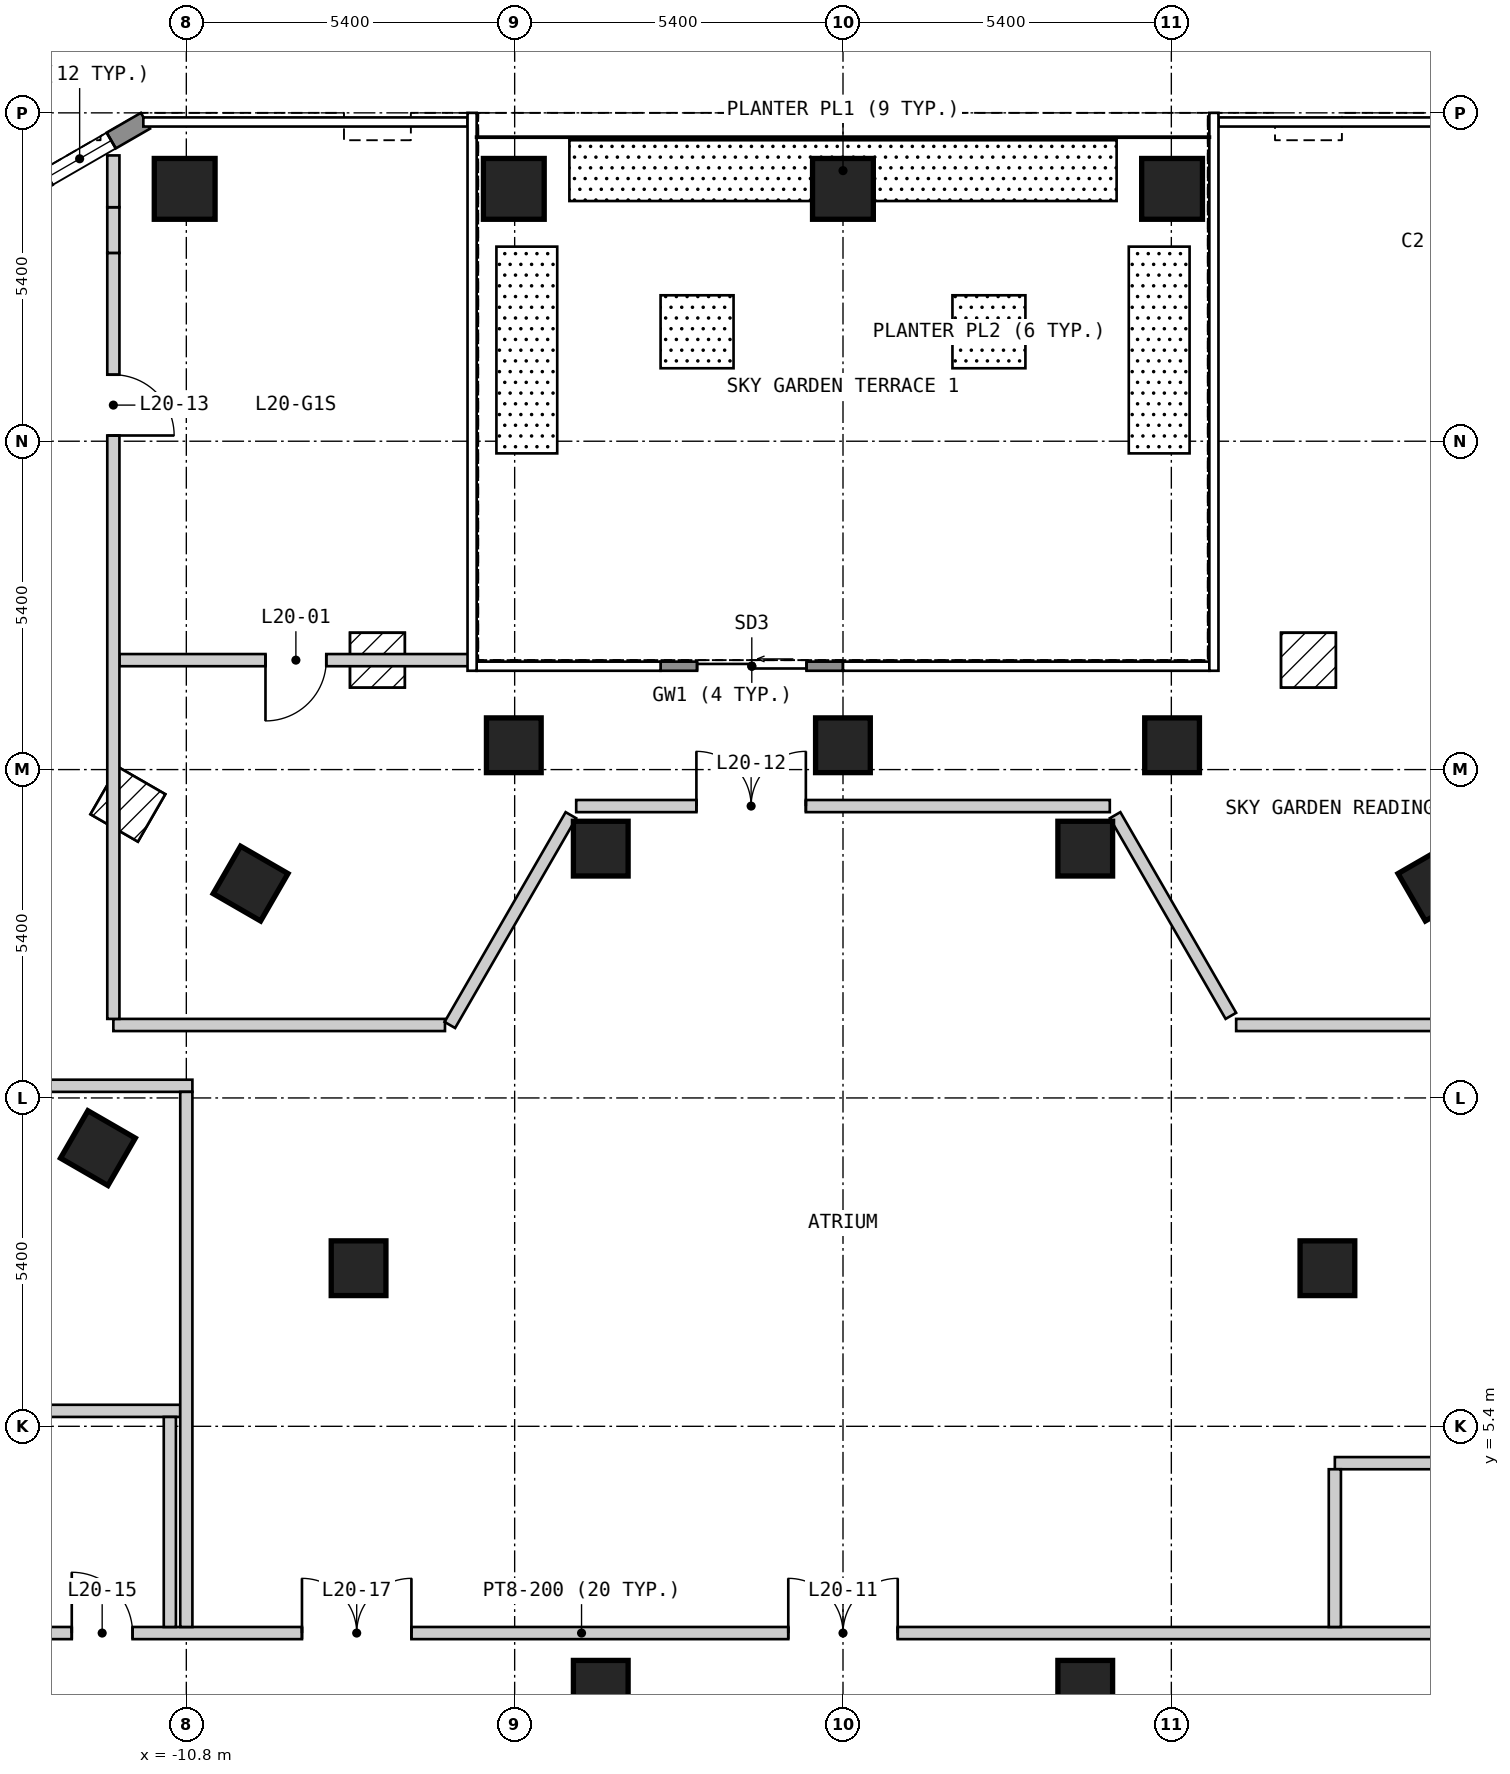
"""IFC4 building model, lengths in metres.
Left out: names, types, materials, properties, quantities, classifications, styles, units other than length and angle.
Written with IfcOpenShell. Run it as: python <this file> out.ifc"""

import sys

from ifc_helpers import new_model, si_unit, direction, frame, frame_2d, origin, origin_2d, place, context, subcontext, project, spatial, polyline, rectangle, outline, extrude, element, fill, save


model = new_model("IFC4")
c1 = context("Model", 3, precision=1e-05, world=origin(), true_north=direction((0.0, 1.0)))
c2 = subcontext(c1, "Body", "Model", "MODEL_VIEW")
j1 = project(units=[si_unit("LENGTHUNIT", "METRE"), si_unit("PLANEANGLEUNIT", "RADIAN")], contexts=[c1])
p1 = place(None, origin())
s1 = spatial("IfcSite", under=j1, at=p1, CompositionType="ELEMENT")
p2 = place(p1, origin())
s2 = spatial("IfcBuilding", under=s1, at=p2, CompositionType="ELEMENT")
p3 = place(p2, frame((0.0, 0.0, 66.0)))
s3 = spatial("IfcBuildingStorey", under=s2, at=p3, CompositionType="ELEMENT", Elevation=66.0)
for number, where, z_axis, x_axis in (
    (1, (5.412, 25.75, 0.0), (0.0, 0.0, 1.0), (-1.0, 0.0, 0.0)),
    (2, (-0.001, 25.75, 0.0), (0.0, 0.0, 1.0), (-1.0, 0.0, 0.0)),
    (3, (-5.414, 25.75, 0.0), (0.0, 0.0, 1.0), (-1.0, 0.0, 0.0)),
    (4, (-10.827, 25.75, 0.0), (0.0, 0.0, 1.0), (-1.0, 0.0, 0.0)),
):
    element("IfcColumn", number, at=place(p3, frame(where, z_axis=z_axis, x_axis=x_axis)), inside=s3, PredefinedType="COLUMN", context=c2, shape_type="SweptSolid", body=[
        extrude(rectangle(XDim=1.0, YDim=1.0, at=origin_2d()), origin(), (0.0, 0.0, 1.0), 6.0),
    ])
for number, where, z_axis, x_axis in (
    (5, (3.984, 1.1, 0.0), (0.0, 0.0, 1.0), (1.0, 0.0, 0.0)),
    (6, (7.967, 8.0, 0.0), (0.0, 0.0, 1.0), (1.0, 0.0, 0.0)),
    (7, (9.743, 14.325, 0.0), (0.0, 0.0, 1.0), (-0.5, 0.866, 0.0)),
    (8, (5.412, 16.6, 0.0), (0.0, 0.0, 1.0), (-1.0, 0.0, 0.0)),
    (9, (3.984, 14.9, 0.0), (0.0, 0.0, 1.0), (1.0, 0.0, 0.0)),
    (10, (-0.001, 16.6, 0.0), (0.0, 0.0, 1.0), (-1.0, 0.0, 0.0)),
    (11, (-3.984, 14.9, 0.0), (0.0, 0.0, 1.0), (1.0, 0.0, 0.0)),
    (12, (-5.414, 16.6, 0.0), (0.0, 0.0, 1.0), (-1.0, 0.0, 0.0)),
    (13, (-9.743, 14.325, 0.0), (0.0, 0.0, 1.0), (-0.5, -0.866, 0.0)),
    (14, (-7.967, 8.0, 0.0), (0.0, 0.0, 1.0), (1.0, 0.0, 0.0)),
    (15, (-12.254, 9.975, 0.0), (0.0, 0.0, 1.0), (-0.5, -0.866, 0.0)),
    (16, (-3.984, 1.1, 0.0), (0.0, 0.0, 1.0), (1.0, 0.0, 0.0)),
):
    element("IfcColumn", number, at=place(p3, frame(where, z_axis=z_axis, x_axis=x_axis)), inside=s3, PredefinedType="COLUMN", context=c2, shape_type="SweptSolid", body=[
        extrude(rectangle(XDim=0.9, YDim=0.9, at=origin_2d()), origin(), (0.0, 0.0, 1.0), 6.0),
    ])
p4 = place(p3, frame((-11.472, 26.87, 0.0), z_axis=(0.0, 0.0, 1.0), x_axis=(-0.866022959057, -0.500004234368, 0.0)))
e17 = element("IfcWall", 17, at=p4, inside=s3, PredefinedType="SOLIDWALL", context=c2, shape_type="SweptSolid", body=[
    extrude(outline(polyline([(0.0, -0.15), (5.0, -0.15), (4.92, 0.15), (0.08, 0.15), (0.0, -0.15)])), origin(), (0.0, 0.0, 1.0), 5.7),
])
p5 = place(p4, frame((0.65, 0.0, 0.15)))
e18 = element("IfcOpeningElement", 18, at=p5, cuts=e17, PredefinedType="OPENING", context=c2, shape_type="SweptSolid", body=[
    extrude(rectangle(XDim=1.2, YDim=2.1, at=frame_2d((0.6, 1.05))), frame((0.0, 0.16, 0.0), z_axis=(0.0, -1.0, 0.0), x_axis=(1.0, 0.0, 0.0)), (0.0, 0.0, 1.0), 0.32),
])
p6 = place(p4, frame((3.149, 0.0, 0.15)))
e19 = element("IfcOpeningElement", 19, at=p6, cuts=e17, PredefinedType="OPENING", context=c2, shape_type="SweptSolid", body=[
    extrude(rectangle(XDim=1.2, YDim=2.1, at=frame_2d((0.6, 1.05))), frame((0.0, 0.16, 0.0), z_axis=(0.0, -1.0, 0.0), x_axis=(1.0, 0.0, 0.0)), (0.0, 0.0, 1.0), 0.32),
])
p7 = place(p3, frame((0.0, 17.9, 0.0), z_axis=(0.0, 0.0, 1.0), x_axis=(-1.0, 0.0, 0.0)))
e20 = element("IfcWall", 20, at=p7, inside=s3, PredefinedType="SOLIDWALL", context=c2, shape_type="SweptSolid", body=[
    extrude(rectangle(XDim=3.0, YDim=0.15, at=frame_2d((1.5, 0.0))), origin(), (0.0, 0.0, 1.0), 5.7),
])
p8 = place(p7, frame((0.6, 0.0, 0.0)))
e21 = element("IfcOpeningElement", 21, at=p8, cuts=e20, PredefinedType="OPENING", context=c2, shape_type="SweptSolid", body=[
    extrude(rectangle(XDim=1.8, YDim=2.4, at=frame_2d((0.9, 1.2))), frame((0.0, 0.085, 0.0), z_axis=(0.0, -1.0, 0.0), x_axis=(1.0, 0.0, 0.0)), (0.0, 0.0, 1.0), 0.17),
])
p9 = place(p3, frame((-22.0, 2.0, 0.0), z_axis=(0.0, 0.0, 1.0), x_axis=(1.0, 0.0, 0.0)))
e22 = element("IfcWall", 22, at=p9, inside=s3, PredefinedType="PARTITIONING", context=c2, shape_type="SweptSolid", body=[
    extrude(rectangle(XDim=35.4, YDim=0.2, at=frame_2d((17.7, 0.0))), origin(), (0.0, 0.0, 1.0), 5.7),
])
p10 = place(p9, frame((3.89, 0.0, 0.0), z_axis=(0.0, 0.0, 1.0), x_axis=(-1.0, 0.0, 0.0)))
e23 = element("IfcOpeningElement", 23, at=p10, cuts=e22, PredefinedType="OPENING", context=c2, shape_type="SweptSolid", body=[
    extrude(rectangle(XDim=1.0, YDim=2.1, at=frame_2d((0.5, 1.05))), frame((0.0, 0.11, 0.0), z_axis=(0.0, -1.0, 0.0), x_axis=(1.0, 0.0, 0.0)), (0.0, 0.0, 1.0), 0.22),
])
p11 = place(p9, frame((21.1, 0.0, 0.0)))
e24 = element("IfcOpeningElement", 24, at=p11, cuts=e22, PredefinedType="OPENING", context=c2, shape_type="SweptSolid", body=[
    extrude(rectangle(XDim=1.8, YDim=2.1, at=frame_2d((0.9, 1.05))), frame((0.0, 0.11, 0.0), z_axis=(0.0, -1.0, 0.0), x_axis=(1.0, 0.0, 0.0)), (0.0, 0.0, 1.0), 0.22),
])
p12 = place(p9, frame((9.316, 0.0, 0.0)))
e25 = element("IfcOpeningElement", 25, at=p12, cuts=e22, PredefinedType="OPENING", context=c2, shape_type="SweptSolid", body=[
    extrude(rectangle(XDim=1.0, YDim=2.1, at=frame_2d((0.5, 1.05))), frame((0.0, 0.11, 0.0), z_axis=(0.0, -1.0, 0.0), x_axis=(1.0, 0.0, 0.0)), (0.0, 0.0, 1.0), 0.22),
])
p13 = place(p9, frame((13.102, 0.0, 0.0)))
e26 = element("IfcOpeningElement", 26, at=p13, cuts=e22, PredefinedType="OPENING", context=c2, shape_type="SweptSolid", body=[
    extrude(rectangle(XDim=1.8, YDim=2.1, at=frame_2d((0.9, 1.05))), frame((0.0, 0.11, 0.0), z_axis=(0.0, -1.0, 0.0), x_axis=(1.0, 0.0, 0.0)), (0.0, 0.0, 1.0), 0.22),
])
p14 = place(p3, frame((8.089, 4.794, 0.0), z_axis=(0.0, 0.0, 1.0), x_axis=(1.0, 0.0, 0.0)))
e27 = element("IfcWall", 27, at=p14, inside=s3, PredefinedType="PARTITIONING", context=c2, shape_type="SweptSolid", body=[
    extrude(rectangle(XDim=17.447, YDim=0.2, at=frame_2d((8.723, 0.0))), origin(), (0.0, 0.0, 1.0), 5.7),
])
p15 = place(p3, frame((-24.964, 5.654, 0.0), z_axis=(0.0, 0.0, 1.0), x_axis=(1.0, 0.0, 0.0)))
e28 = element("IfcWall", 28, at=p15, inside=s3, PredefinedType="PARTITIONING", context=c2, shape_type="SweptSolid", body=[
    extrude(rectangle(XDim=14.064, YDim=0.2, at=frame_2d((7.032, 0.0))), origin(), (0.0, 0.0, 1.0), 5.7),
])
p16 = place(p3, frame((-21.853, 11.0, 0.0), z_axis=(0.0, 0.0, 1.0), x_axis=(1.0, 0.0, 0.0)))
e29 = element("IfcWall", 29, at=p16, inside=s3, PredefinedType="PARTITIONING", context=c2, shape_type="SweptSolid", body=[
    extrude(rectangle(XDim=11.153, YDim=0.2, at=frame_2d((5.577, 0.0))), origin(), (0.0, 0.0, 1.0), 5.7),
])
p17 = place(p16, frame((5.691, 0.0, 0.0), z_axis=(0.0, 0.0, 1.0), x_axis=(-1.0, 0.0, 0.0)))
e30 = element("IfcOpeningElement", 30, at=p17, cuts=e29, PredefinedType="OPENING", context=c2, shape_type="SweptSolid", body=[
    extrude(rectangle(XDim=1.8, YDim=2.1, at=frame_2d((0.9, 1.05))), frame((0.0, 0.11, 0.0), z_axis=(0.0, -1.0, 0.0), x_axis=(1.0, 0.0, 0.0)), (0.0, 0.0, 1.0), 0.22),
])
p18 = place(p3, frame((-12.0, 12.0, 0.0), z_axis=(0.0, 0.0, 1.0), x_axis=(1.0, 0.0, 0.0)))
e31 = element("IfcWall", 31, at=p18, inside=s3, PredefinedType="PARTITIONING", context=c2, shape_type="SweptSolid", body=[
    extrude(rectangle(XDim=5.454, YDim=0.2, at=frame_2d((2.727, 0.0))), origin(), (0.0, 0.0, 1.0), 5.7),
])
p19 = place(p3, frame((6.466, 12.0, 0.0), z_axis=(0.0, 0.0, 1.0), x_axis=(1.0, 0.0, 0.0)))
e32 = element("IfcWall", 32, at=p19, inside=s3, PredefinedType="PARTITIONING", context=c2, shape_type="SweptSolid", body=[
    extrude(rectangle(XDim=5.634, YDim=0.2, at=frame_2d((2.817, 0.0))), origin(), (0.0, 0.0, 1.0), 5.7),
])
p20 = place(p3, frame((-4.388, 15.6, 0.0), z_axis=(0.0, 0.0, 1.0), x_axis=(1.0, 0.0, 0.0)))
e33 = element("IfcWall", 33, at=p20, inside=s3, PredefinedType="PARTITIONING", context=c2, shape_type="SweptSolid", body=[
    extrude(rectangle(XDim=8.776, YDim=0.2, at=frame_2d((4.388, 0.0))), origin(), (0.0, 0.0, 1.0), 5.7),
])
p21 = place(p20, frame((1.977, 0.0, 0.0)))
e34 = element("IfcOpeningElement", 34, at=p21, cuts=e33, PredefinedType="OPENING", context=c2, shape_type="SweptSolid", body=[
    extrude(rectangle(XDim=1.8, YDim=2.1, at=frame_2d((0.9, 1.05))), frame((0.0, 0.11, 0.0), z_axis=(0.0, -1.0, 0.0), x_axis=(1.0, 0.0, 0.0)), (0.0, 0.0, 1.0), 0.22),
])
p22 = place(p3, frame((-11.9, 18.0, 0.0), z_axis=(0.0, 0.0, 1.0), x_axis=(1.0, 0.0, 0.0)))
e35 = element("IfcWall", 35, at=p22, inside=s3, PredefinedType="PARTITIONING", context=c2, shape_type="SweptSolid", body=[
    extrude(rectangle(XDim=5.82, YDim=0.2, at=frame_2d((2.91, 0.0))), origin(), (0.0, 0.0, 1.0), 5.7),
])
p23 = place(p22, frame((3.402, 0.0, 0.0), z_axis=(0.0, 0.0, 1.0), x_axis=(-1.0, 0.0, 0.0)))
e36 = element("IfcOpeningElement", 36, at=p23, cuts=e35, PredefinedType="OPENING", context=c2, shape_type="SweptSolid", body=[
    extrude(rectangle(XDim=1.0, YDim=2.1, at=frame_2d((0.5, 1.05))), frame((0.0, 0.11, 0.0), z_axis=(0.0, -1.0, 0.0), x_axis=(1.0, 0.0, 0.0)), (0.0, 0.0, 1.0), 0.22),
])
p24 = place(p3, frame((-12.0, 12.1, 0.0), z_axis=(0.0, 0.0, 1.0), x_axis=(0.0, 1.0, 0.0)))
e37 = element("IfcWall", 37, at=p24, inside=s3, PredefinedType="PARTITIONING", context=c2, shape_type="SweptSolid", body=[
    extrude(rectangle(XDim=12.597, YDim=0.2, at=frame_2d((6.298, 0.0))), origin(), (0.0, 0.0, 1.0), 5.7),
])
p25 = place(p24, frame((10.594, 0.0, 0.0), z_axis=(0.0, 0.0, 1.0), x_axis=(-1.0, 0.0, 0.0)))
e38 = element("IfcOpeningElement", 38, at=p25, cuts=e37, PredefinedType="OPENING", context=c2, shape_type="SweptSolid", body=[
    extrude(rectangle(XDim=1.0, YDim=2.1, at=frame_2d((0.5, 1.05))), frame((0.0, 0.11, 0.0), z_axis=(0.0, -1.0, 0.0), x_axis=(1.0, 0.0, 0.0)), (0.0, 0.0, 1.0), 0.22),
])
p26 = place(p3, frame((-12.0, 24.697, 0.0), z_axis=(0.0, 0.0, 1.0), x_axis=(0.0, 1.0, 0.0)))
e39 = element("IfcWall", 39, at=p26, inside=s3, PredefinedType="PARTITIONING", context=c2, shape_type="SweptSolid", body=[
    extrude(rectangle(XDim=0.751, YDim=0.2, at=frame_2d((0.375, 0.0))), origin(), (0.0, 0.0, 1.0), 5.02),
])
p27 = place(p3, frame((-12.0, 25.448, 0.0), z_axis=(0.0, 0.0, 1.0), x_axis=(0.0, 1.0, 0.0)))
e40 = element("IfcWall", 40, at=p27, inside=s3, PredefinedType="PARTITIONING", context=c2, shape_type="SweptSolid", body=[
    extrude(rectangle(XDim=0.852, YDim=0.2, at=frame_2d((0.426, 0.0))), origin(), (0.0, 0.0, 1.0), 5.7),
])
p28 = place(p3, frame((-11.071, 2.1, 0.0), z_axis=(0.0, 0.0, 1.0), x_axis=(0.0, 1.0, 0.0)))
e41 = element("IfcWall", 41, at=p28, inside=s3, PredefinedType="PARTITIONING", context=c2, shape_type="SweptSolid", body=[
    extrude(rectangle(XDim=3.454, YDim=0.2, at=frame_2d((1.727, 0.0))), origin(), (0.0, 0.0, 1.0), 5.7),
])
p29 = place(p3, frame((-10.8, 2.1, 0.0), z_axis=(0.0, 0.0, 1.0), x_axis=(0.0, 1.0, 0.0)))
e42 = element("IfcWall", 42, at=p29, inside=s3, PredefinedType="PARTITIONING", context=c2, shape_type="SweptSolid", body=[
    extrude(rectangle(XDim=8.8, YDim=0.2, at=frame_2d((4.4, 0.0))), origin(), (0.0, 0.0, 1.0), 5.7),
])
p30 = place(p3, frame((8.089, 2.1, 0.0), z_axis=(0.0, 0.0, 1.0), x_axis=(0.0, 1.0, 0.0)))
e43 = element("IfcWall", 43, at=p30, inside=s3, PredefinedType="PARTITIONING", context=c2, shape_type="SweptSolid", body=[
    extrude(rectangle(XDim=2.594, YDim=0.2, at=frame_2d((1.297, 0.0))), origin(), (0.0, 0.0, 1.0), 5.7),
])
p31 = place(p3, frame((4.475, 15.45, 0.0), z_axis=(0.0, 0.0, 1.0), x_axis=(0.499709509062, -0.866193053859, 0.0)))
e44 = element("IfcWall", 44, at=p31, inside=s3, PredefinedType="PARTITIONING", context=c2, shape_type="SweptSolid", body=[
    extrude(rectangle(XDim=3.81, YDim=0.2, at=frame_2d((1.905, 0.0))), origin(), (0.0, 0.0, 1.0), 5.7),
])
p32 = place(p3, frame((-6.466, 12.0, 0.0), z_axis=(0.0, 0.0, 1.0), x_axis=(0.49983741437, 0.866119252295, 0.0)))
e45 = element("IfcWall", 45, at=p32, inside=s3, PredefinedType="PARTITIONING", context=c2, shape_type="SweptSolid", body=[
    extrude(rectangle(XDim=3.983, YDim=0.2, at=frame_2d((1.992, 0.0))), origin(), (0.0, 0.0, 1.0), 5.7),
])
p33 = place(p5, origin())
e46 = element("IfcWindow", 46, at=p33, inside=s3, PartitioningType="SINGLE_PANEL", PredefinedType="WINDOW", context=c2, shape_type="SweptSolid", body=[
    extrude(rectangle(XDim=1.2, YDim=2.1, at=frame_2d((0.6, 1.05))), frame((0.0, 0.03, 0.0), z_axis=(0.0, -1.0, 0.0), x_axis=(1.0, 0.0, 0.0)), (0.0, 0.0, 1.0), 0.06),
])
fill(e18, e46)
p34 = place(p8, origin())
e47 = element("IfcDoor", 47, at=p34, inside=s3, OperationType="SLIDING_TO_LEFT", PredefinedType="DOOR", context=c2, shape_type="SweptSolid", body=[
    extrude(rectangle(XDim=1.8, YDim=2.4, at=frame_2d((0.9, 1.2))), frame((0.0, 0.025, 0.0), z_axis=(0.0, -1.0, 0.0), x_axis=(1.0, 0.0, 0.0)), (0.0, 0.0, 1.0), 0.05),
])
fill(e21, e47)
p35 = place(p23, origin())
e48 = element("IfcDoor", 48, at=p35, inside=s3, OperationType="SINGLE_SWING_RIGHT", PredefinedType="DOOR", context=c2, shape_type="SweptSolid", body=[
    extrude(rectangle(XDim=1.0, YDim=2.1, at=frame_2d((0.5, 1.05))), frame((0.0, 0.025, 0.0), z_axis=(0.0, -1.0, 0.0), x_axis=(1.0, 0.0, 0.0)), (0.0, 0.0, 1.0), 0.05),
])
fill(e36, e48)
p36 = place(p11, origin())
e49 = element("IfcDoor", 49, at=p36, inside=s3, OperationType="DOUBLE_DOOR_SINGLE_SWING", PredefinedType="DOOR", context=c2, shape_type="SweptSolid", body=[
    extrude(rectangle(XDim=1.8, YDim=2.1, at=frame_2d((0.9, 1.05))), frame((0.0, 0.025, 0.0), z_axis=(0.0, -1.0, 0.0), x_axis=(1.0, 0.0, 0.0)), (0.0, 0.0, 1.0), 0.05),
])
fill(e24, e49)
p37 = place(p21, origin())
e50 = element("IfcDoor", 50, at=p37, inside=s3, OperationType="DOUBLE_DOOR_SINGLE_SWING", PredefinedType="DOOR", context=c2, shape_type="SweptSolid", body=[
    extrude(rectangle(XDim=1.8, YDim=2.1, at=frame_2d((0.9, 1.05))), frame((0.0, 0.025, 0.0), z_axis=(0.0, -1.0, 0.0), x_axis=(1.0, 0.0, 0.0)), (0.0, 0.0, 1.0), 0.05),
])
fill(e34, e50)
p38 = place(p25, origin())
e51 = element("IfcDoor", 51, at=p38, inside=s3, OperationType="SINGLE_SWING_RIGHT", PredefinedType="DOOR", context=c2, shape_type="SweptSolid", body=[
    extrude(rectangle(XDim=1.0, YDim=2.1, at=frame_2d((0.5, 1.05))), frame((0.0, 0.025, 0.0), z_axis=(0.0, -1.0, 0.0), x_axis=(1.0, 0.0, 0.0)), (0.0, 0.0, 1.0), 0.05),
])
fill(e38, e51)
p39 = place(p12, origin())
e52 = element("IfcDoor", 52, at=p39, inside=s3, OperationType="SINGLE_SWING_LEFT", PredefinedType="DOOR", context=c2, shape_type="SweptSolid", body=[
    extrude(rectangle(XDim=1.0, YDim=2.1, at=frame_2d((0.5, 1.05))), frame((0.0, 0.025, 0.0), z_axis=(0.0, -1.0, 0.0), x_axis=(1.0, 0.0, 0.0)), (0.0, 0.0, 1.0), 0.05),
])
fill(e25, e52)
p40 = place(p13, origin())
e53 = element("IfcDoor", 53, at=p40, inside=s3, OperationType="DOUBLE_DOOR_SINGLE_SWING", PredefinedType="DOOR", context=c2, shape_type="SweptSolid", body=[
    extrude(rectangle(XDim=1.8, YDim=2.1, at=frame_2d((0.9, 1.05))), frame((0.0, 0.025, 0.0), z_axis=(0.0, -1.0, 0.0), x_axis=(1.0, 0.0, 0.0)), (0.0, 0.0, 1.0), 0.05),
])
fill(e26, e53)
save(model, sys.argv[1])
